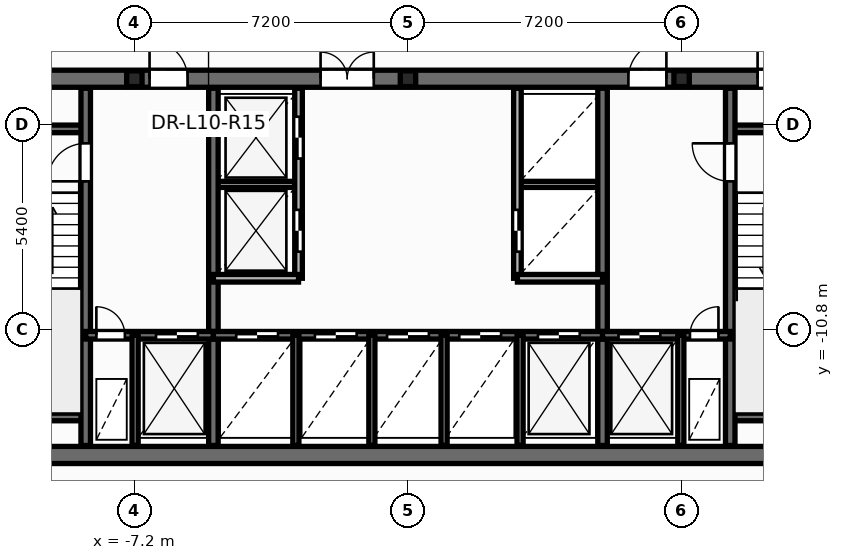
"""IFC4 building model, lengths in metres.
Left out: names, types, materials, properties, quantities, classifications, styles, units other than length and angle.
Written with IfcOpenShell. Run it as: python <this file> out.ifc"""

import sys

from ifc_helpers import new_model, si_unit, direction, frame, frame_2d, origin, origin_2d, place, context, subcontext, project, spatial, rectangle, i_section, extrude, element, fill, save


model = new_model("IFC4")
c1 = context("Model", 3, precision=1e-05, world=origin(), true_north=direction((0.0, 1.0)))
c2 = subcontext(c1, "Body", "Model", "MODEL_VIEW")
j1 = project(units=[si_unit("LENGTHUNIT", "METRE"), si_unit("PLANEANGLEUNIT", "RADIAN")], contexts=[c1])
p1 = place(None, origin())
s1 = spatial("IfcSite", under=j1, at=p1, CompositionType="ELEMENT")
p2 = place(p1, origin())
s2 = spatial("IfcBuilding", under=s1, at=p2, CompositionType="ELEMENT")
p3 = place(p2, frame((0.0, 0.0, 42.3)))
s3 = spatial("IfcBuildingStorey", under=s2, at=p3, CompositionType="ELEMENT", Elevation=42.3)
for number, where, z_axis, x_axis in (
    (1, (-7.2, -4.2, 0.0), (0.0, 0.0, 1.0), (1.0, 0.0, 0.0)),
    (2, (0.0, -4.2, 0.0), (0.0, 0.0, 1.0), (1.0, 0.0, 0.0)),
    (3, (7.2, -4.2, 0.0), (0.0, 0.0, 1.0), (1.0, 0.0, 0.0)),
):
    element("IfcColumn", number, at=place(p3, frame(where, z_axis=z_axis, x_axis=x_axis)), inside=s3, PredefinedType="PILASTER", context=c2, shape_type="SweptSolid", body=[
        extrude(i_section(OverallWidth=0.405, OverallDepth=0.414, WebThickness=0.022, FlangeThickness=0.032, at=origin_2d()), origin(), (0.0, 0.0, 1.0), 3.6),
    ])
for number, where, z_axis, x_axis in (
    (4, (-5.12, -6.98, 0.0), (0.0, 0.0, 1.0), (1.0, 0.0, 0.0)),
    (5, (2.88, -6.98, 0.0), (0.0, 0.0, 1.0), (1.0, 0.0, 0.0)),
):
    element("IfcWall", number, at=place(p3, frame(where, z_axis=z_axis, x_axis=x_axis)), inside=s3, PredefinedType="PARTITIONING", context=c2, shape_type="SweptSolid", body=[
        extrude(rectangle(XDim=2.24, YDim=0.16, at=frame_2d((1.12, 0.0))), origin(), (0.0, 0.0, 1.0), 3.35),
    ])
p4 = place(p3, frame((-12.65, -14.1, 0.0), z_axis=(0.0, 0.0, 1.0), x_axis=(1.0, 0.0, 0.0)))
e6 = element("IfcWall", 6, at=p4, inside=s3, PredefinedType="SHEAR", context=c2, shape_type="SweptSolid", body=[
    extrude(rectangle(XDim=25.3, YDim=0.45, at=frame_2d((12.65, 0.0))), origin(), (0.0, 0.0, 1.0), 3.6),
])
p5 = place(p3, frame((-12.65, -4.2, 0.0), z_axis=(0.0, 0.0, 1.0), x_axis=(1.0, 0.0, 0.0)))
e7 = element("IfcWall", 7, at=p5, inside=s3, PredefinedType="SHEAR", context=c2, shape_type="SweptSolid", body=[
    extrude(rectangle(XDim=25.3, YDim=0.45, at=frame_2d((12.65, 0.0))), origin(), (0.0, 0.0, 1.0), 3.6),
])
p6 = place(p5, frame((1.85, 0.0, 0.0)))
e8 = element("IfcOpeningElement", 8, at=p6, cuts=e7, PredefinedType="OPENING", context=c2, shape_type="SweptSolid", body=[
    extrude(rectangle(XDim=0.756, YDim=2.054, at=frame_2d((0.375, 1.027))), frame((0.0, 0.235, 0.0), z_axis=(0.0, -1.0, 0.0), x_axis=(1.0, 0.0, 0.0)), (0.0, 0.0, 1.0), 0.47),
])
p7 = place(p5, frame((21.85, 0.0, 0.0)))
e9 = element("IfcOpeningElement", 9, at=p7, cuts=e7, PredefinedType="OPENING", context=c2, shape_type="SweptSolid", body=[
    extrude(rectangle(XDim=0.756, YDim=2.054, at=frame_2d((0.375, 1.027))), frame((0.0, 0.235, 0.0), z_axis=(0.0, -1.0, 0.0), x_axis=(1.0, 0.0, 0.0)), (0.0, 0.0, 1.0), 0.47),
])
p8 = place(p5, frame((23.5, 0.0, 0.0)))
e10 = element("IfcOpeningElement", 10, at=p8, cuts=e7, PredefinedType="OPENING", context=c2, shape_type="SweptSolid", body=[
    extrude(rectangle(XDim=0.756, YDim=2.054, at=frame_2d((0.375, 1.027))), frame((0.0, 0.235, 0.0), z_axis=(0.0, -1.0, 0.0), x_axis=(1.0, 0.0, 0.0)), (0.0, 0.0, 1.0), 0.47),
])
p9 = place(p5, frame((5.85, 0.0, 0.0)))
e11 = element("IfcOpeningElement", 11, at=p9, cuts=e7, PredefinedType="OPENING", context=c2, shape_type="SweptSolid", body=[
    extrude(rectangle(XDim=1.006, YDim=2.104, at=frame_2d((0.5, 1.052))), frame((0.0, 0.235, 0.0), z_axis=(0.0, -1.0, 0.0), x_axis=(1.0, 0.0, 0.0)), (0.0, 0.0, 1.0), 0.47),
])
p10 = place(p5, frame((10.35, 0.0, 0.0)))
e12 = element("IfcOpeningElement", 12, at=p10, cuts=e7, PredefinedType="OPENING", context=c2, shape_type="SweptSolid", body=[
    extrude(rectangle(XDim=1.406, YDim=2.154, at=frame_2d((0.7, 1.077))), frame((0.0, 0.235, 0.0), z_axis=(0.0, -1.0, 0.0), x_axis=(1.0, 0.0, 0.0)), (0.0, 0.0, 1.0), 0.47),
])
p11 = place(p5, frame((18.45, 0.0, 0.0)))
e13 = element("IfcOpeningElement", 13, at=p11, cuts=e7, PredefinedType="OPENING", context=c2, shape_type="SweptSolid", body=[
    extrude(rectangle(XDim=1.006, YDim=2.104, at=frame_2d((0.5, 1.052))), frame((0.0, 0.235, 0.0), z_axis=(0.0, -1.0, 0.0), x_axis=(1.0, 0.0, 0.0)), (0.0, 0.0, 1.0), 0.47),
])
for number, where, z_axis, x_axis in (
    (14, (-12.35, -5.52, 0.0), (0.0, 0.0, 1.0), (1.0, 0.0, 0.0)),
    (15, (-12.35, -13.1, 0.0), (0.0, 0.0, 1.0), (1.0, 0.0, 0.0)),
    (16, (8.48, -5.52, 0.0), (0.0, 0.0, 1.0), (1.0, 0.0, 0.0)),
    (17, (8.48, -13.1, 0.0), (0.0, 0.0, 1.0), (1.0, 0.0, 0.0)),
):
    element("IfcWall", number, at=place(p3, frame(where, z_axis=z_axis, x_axis=x_axis)), inside=s3, PredefinedType="SOLIDWALL", context=c2, shape_type="SweptSolid", body=[
        extrude(rectangle(XDim=3.87, YDim=0.2, at=frame_2d((1.935, 0.0))), origin(), (0.0, 0.0, 1.0), 3.6),
    ])
p12 = place(p3, frame((-8.48, -13.85, 0.0), z_axis=(0.0, 0.0, 1.0), x_axis=(0.0, 1.0, 0.0)))
e18 = element("IfcWall", 18, at=p12, inside=s3, PredefinedType="SHEAR", context=c2, shape_type="SweptSolid", body=[
    extrude(rectangle(XDim=9.4, YDim=0.25, at=frame_2d((4.7, 0.0))), origin(), (0.0, 0.0, 1.0), 3.6),
])
p13 = place(p12, frame((6.95, 0.0, 0.0)))
e19 = element("IfcOpeningElement", 19, at=p13, cuts=e18, PredefinedType="OPENING", context=c2, shape_type="SweptSolid", body=[
    extrude(rectangle(XDim=1.006, YDim=2.104, at=frame_2d((0.5, 1.052))), frame((0.0, 0.135, 0.0), z_axis=(0.0, -1.0, 0.0), x_axis=(1.0, 0.0, 0.0)), (0.0, 0.0, 1.0), 0.27),
])
p14 = place(p3, frame((8.48, -13.85, 0.0), z_axis=(0.0, 0.0, 1.0), x_axis=(0.0, 1.0, 0.0)))
e20 = element("IfcWall", 20, at=p14, inside=s3, PredefinedType="SHEAR", context=c2, shape_type="SweptSolid", body=[
    extrude(rectangle(XDim=9.4, YDim=0.25, at=frame_2d((4.7, 0.0))), origin(), (0.0, 0.0, 1.0), 3.6),
])
p15 = place(p14, frame((6.95, 0.0, 0.0)))
e21 = element("IfcOpeningElement", 21, at=p15, cuts=e20, PredefinedType="OPENING", context=c2, shape_type="SweptSolid", body=[
    extrude(rectangle(XDim=1.006, YDim=2.104, at=frame_2d((0.5, 1.052))), frame((0.0, 0.135, 0.0), z_axis=(0.0, -1.0, 0.0), x_axis=(1.0, 0.0, 0.0)), (0.0, 0.0, 1.0), 0.27),
])
for number, where, z_axis, x_axis in (
    (22, (-5.12, -13.85, 0.0), (0.0, 0.0, 1.0), (0.0, 1.0, 0.0)),
    (23, (5.12, -13.85, 0.0), (0.0, 0.0, 1.0), (0.0, 1.0, 0.0)),
):
    element("IfcWall", number, at=place(p3, frame(where, z_axis=z_axis, x_axis=x_axis)), inside=s3, PredefinedType="SHEAR", context=c2, shape_type="SweptSolid", body=[
        extrude(rectangle(XDim=9.4, YDim=0.25, at=frame_2d((4.7, 0.0))), origin(), (0.0, 0.0, 1.0), 3.6),
    ])
p16 = place(p3, frame((-8.48, -10.95, 0.0), z_axis=(0.0, 0.0, 1.0), x_axis=(1.0, 0.0, 0.0)))
e24 = element("IfcWall", 24, at=p16, inside=s3, PredefinedType="SOLIDWALL", context=c2, shape_type="SweptSolid", body=[
    extrude(rectangle(XDim=3.36, YDim=0.2, at=frame_2d((1.68, 0.0))), origin(), (0.0, 0.0, 1.0), 3.6),
])
p17 = place(p16, frame((0.28, 0.0, 0.0)))
e25 = element("IfcOpeningElement", 25, at=p17, cuts=e24, PredefinedType="OPENING", context=c2, shape_type="SweptSolid", body=[
    extrude(rectangle(XDim=0.756, YDim=2.054, at=frame_2d((0.375, 1.027))), frame((0.0, 0.11, 0.0), z_axis=(0.0, -1.0, 0.0), x_axis=(1.0, 0.0, 0.0)), (0.0, 0.0, 1.0), 0.22),
])
p18 = place(p16, frame((1.85, 0.0, 0.0)))
e26 = element("IfcOpeningElement", 26, at=p18, cuts=e24, PredefinedType="OPENING", context=c2, shape_type="SweptSolid", body=[
    extrude(rectangle(XDim=1.106, YDim=2.104, at=frame_2d((0.55, 1.052))), frame((0.0, 0.11, 0.0), z_axis=(0.0, -1.0, 0.0), x_axis=(1.0, 0.0, 0.0)), (0.0, 0.0, 1.0), 0.22),
])
p19 = place(p3, frame((-5.12, -10.95, 0.0), z_axis=(0.0, 0.0, 1.0), x_axis=(1.0, 0.0, 0.0)))
e27 = element("IfcWall", 27, at=p19, inside=s3, PredefinedType="SOLIDWALL", context=c2, shape_type="SweptSolid", body=[
    extrude(rectangle(XDim=10.24, YDim=0.2, at=frame_2d((5.12, 0.0))), origin(), (0.0, 0.0, 1.0), 3.6),
])
p20 = place(p19, frame((0.6, 0.0, 0.0)))
e28 = element("IfcOpeningElement", 28, at=p20, cuts=e27, PredefinedType="OPENING", context=c2, shape_type="SweptSolid", body=[
    extrude(rectangle(XDim=1.106, YDim=2.104, at=frame_2d((0.55, 1.052))), frame((0.0, 0.11, 0.0), z_axis=(0.0, -1.0, 0.0), x_axis=(1.0, 0.0, 0.0)), (0.0, 0.0, 1.0), 0.22),
])
p21 = place(p19, frame((2.67, 0.0, 0.0)))
e29 = element("IfcOpeningElement", 29, at=p21, cuts=e27, PredefinedType="OPENING", context=c2, shape_type="SweptSolid", body=[
    extrude(rectangle(XDim=1.106, YDim=2.104, at=frame_2d((0.55, 1.052))), frame((0.0, 0.11, 0.0), z_axis=(0.0, -1.0, 0.0), x_axis=(1.0, 0.0, 0.0)), (0.0, 0.0, 1.0), 0.22),
])
p22 = place(p19, frame((4.57, 0.0, 0.0)))
e30 = element("IfcOpeningElement", 30, at=p22, cuts=e27, PredefinedType="OPENING", context=c2, shape_type="SweptSolid", body=[
    extrude(rectangle(XDim=1.106, YDim=2.104, at=frame_2d((0.55, 1.052))), frame((0.0, 0.11, 0.0), z_axis=(0.0, -1.0, 0.0), x_axis=(1.0, 0.0, 0.0)), (0.0, 0.0, 1.0), 0.22),
])
p23 = place(p19, frame((6.47, 0.0, 0.0)))
e31 = element("IfcOpeningElement", 31, at=p23, cuts=e27, PredefinedType="OPENING", context=c2, shape_type="SweptSolid", body=[
    extrude(rectangle(XDim=1.106, YDim=2.104, at=frame_2d((0.55, 1.052))), frame((0.0, 0.11, 0.0), z_axis=(0.0, -1.0, 0.0), x_axis=(1.0, 0.0, 0.0)), (0.0, 0.0, 1.0), 0.22),
])
p24 = place(p19, frame((8.54, 0.0, 0.0)))
e32 = element("IfcOpeningElement", 32, at=p24, cuts=e27, PredefinedType="OPENING", context=c2, shape_type="SweptSolid", body=[
    extrude(rectangle(XDim=1.106, YDim=2.104, at=frame_2d((0.55, 1.052))), frame((0.0, 0.11, 0.0), z_axis=(0.0, -1.0, 0.0), x_axis=(1.0, 0.0, 0.0)), (0.0, 0.0, 1.0), 0.22),
])
p25 = place(p3, frame((5.12, -10.95, 0.0), z_axis=(0.0, 0.0, 1.0), x_axis=(1.0, 0.0, 0.0)))
e33 = element("IfcWall", 33, at=p25, inside=s3, PredefinedType="SOLIDWALL", context=c2, shape_type="SweptSolid", body=[
    extrude(rectangle(XDim=3.36, YDim=0.2, at=frame_2d((1.68, 0.0))), origin(), (0.0, 0.0, 1.0), 3.6),
])
p26 = place(p25, frame((0.42, 0.0, 0.0)))
e34 = element("IfcOpeningElement", 34, at=p26, cuts=e33, PredefinedType="OPENING", context=c2, shape_type="SweptSolid", body=[
    extrude(rectangle(XDim=1.106, YDim=2.104, at=frame_2d((0.55, 1.052))), frame((0.0, 0.11, 0.0), z_axis=(0.0, -1.0, 0.0), x_axis=(1.0, 0.0, 0.0)), (0.0, 0.0, 1.0), 0.22),
])
p27 = place(p25, frame((2.3, 0.0, 0.0)))
e35 = element("IfcOpeningElement", 35, at=p27, cuts=e33, PredefinedType="OPENING", context=c2, shape_type="SweptSolid", body=[
    extrude(rectangle(XDim=0.756, YDim=2.054, at=frame_2d((0.375, 1.027))), frame((0.0, 0.11, 0.0), z_axis=(0.0, -1.0, 0.0), x_axis=(1.0, 0.0, 0.0)), (0.0, 0.0, 1.0), 0.22),
])
for number, where, z_axis, x_axis in (
    (36, (-7.18, -13.85, 0.0), (0.0, 0.0, 1.0), (0.0, 1.0, 0.0)),
    (37, (7.18, -13.85, 0.0), (0.0, 0.0, 1.0), (0.0, 1.0, 0.0)),
    (38, (-2.95, -13.85, 0.0), (0.0, 0.0, 1.0), (0.0, 1.0, 0.0)),
    (39, (2.95, -13.85, 0.0), (0.0, 0.0, 1.0), (0.0, 1.0, 0.0)),
):
    element("IfcWall", number, at=place(p3, frame(where, z_axis=z_axis, x_axis=x_axis)), inside=s3, PredefinedType="PARTITIONING", context=c2, shape_type="SweptSolid", body=[
        extrude(rectangle(XDim=2.9, YDim=0.16, at=frame_2d((1.45, 0.0))), origin(), (0.0, 0.0, 1.0), 2.375),
    ])
p28 = place(p3, frame((-2.88, -9.45, 0.0), z_axis=(0.0, 0.0, 1.0), x_axis=(0.0, 1.0, 0.0)))
e40 = element("IfcWall", 40, at=p28, inside=s3, PredefinedType="SOLIDWALL", context=c2, shape_type="SweptSolid", body=[
    extrude(rectangle(XDim=5.0, YDim=0.2, at=frame_2d((2.5, 0.0))), origin(), (0.0, 0.0, 1.0), 3.35),
])
p29 = place(p28, frame((0.7, 0.0, 0.0)))
e41 = element("IfcOpeningElement", 41, at=p29, cuts=e40, PredefinedType="OPENING", context=c2, shape_type="SweptSolid", body=[
    extrude(rectangle(XDim=1.106, YDim=2.104, at=frame_2d((0.55, 1.052))), frame((0.0, 0.11, 0.0), z_axis=(0.0, -1.0, 0.0), x_axis=(1.0, 0.0, 0.0)), (0.0, 0.0, 1.0), 0.22),
])
p30 = place(p28, frame((3.15, 0.0, 0.0)))
e42 = element("IfcOpeningElement", 42, at=p30, cuts=e40, PredefinedType="OPENING", context=c2, shape_type="SweptSolid", body=[
    extrude(rectangle(XDim=1.106, YDim=2.104, at=frame_2d((0.55, 1.052))), frame((0.0, 0.11, 0.0), z_axis=(0.0, -1.0, 0.0), x_axis=(1.0, 0.0, 0.0)), (0.0, 0.0, 1.0), 0.22),
])
p31 = place(p3, frame((-5.12, -9.45, 0.0), z_axis=(0.0, 0.0, 1.0), x_axis=(1.0, 0.0, 0.0)))
e43 = element("IfcWall", 43, at=p31, inside=s3, PredefinedType="SOLIDWALL", context=c2, shape_type="SweptSolid", body=[
    extrude(rectangle(XDim=2.24, YDim=0.2, at=frame_2d((1.12, 0.0))), origin(), (0.0, 0.0, 1.0), 3.35),
])
p32 = place(p3, frame((2.88, -9.45, 0.0), z_axis=(0.0, 0.0, 1.0), x_axis=(0.0, 1.0, 0.0)))
e44 = element("IfcWall", 44, at=p32, inside=s3, PredefinedType="SOLIDWALL", context=c2, shape_type="SweptSolid", body=[
    extrude(rectangle(XDim=5.0, YDim=0.2, at=frame_2d((2.5, 0.0))), origin(), (0.0, 0.0, 1.0), 3.35),
])
p33 = place(p32, frame((0.7, 0.0, 0.0)))
e45 = element("IfcOpeningElement", 45, at=p33, cuts=e44, PredefinedType="OPENING", context=c2, shape_type="SweptSolid", body=[
    extrude(rectangle(XDim=1.106, YDim=2.104, at=frame_2d((0.55, 1.052))), frame((0.0, 0.11, 0.0), z_axis=(0.0, -1.0, 0.0), x_axis=(1.0, 0.0, 0.0)), (0.0, 0.0, 1.0), 0.22),
])
p34 = place(p3, frame((2.88, -9.45, 0.0), z_axis=(0.0, 0.0, 1.0), x_axis=(1.0, 0.0, 0.0)))
e46 = element("IfcWall", 46, at=p34, inside=s3, PredefinedType="SOLIDWALL", context=c2, shape_type="SweptSolid", body=[
    extrude(rectangle(XDim=2.24, YDim=0.2, at=frame_2d((1.12, 0.0))), origin(), (0.0, 0.0, 1.0), 3.35),
])
for number, where, z_axis, x_axis in (
    (47, (-0.95, -13.85, 0.0), (0.0, 0.0, 1.0), (0.0, 1.0, 0.0)),
    (48, (0.95, -13.85, 0.0), (0.0, 0.0, 1.0), (0.0, 1.0, 0.0)),
):
    element("IfcWall", number, at=place(p3, frame(where, z_axis=z_axis, x_axis=x_axis)), inside=s3, PredefinedType="PARTITIONING", context=c2, shape_type="SweptSolid", body=[
        extrude(rectangle(XDim=2.9, YDim=0.16, at=frame_2d((1.45, 0.0))), origin(), (0.0, 0.0, 1.0), 2.375),
    ])
p35 = place(p29, origin())
e49 = element("IfcDoor", 49, at=p35, inside=s3, OperationType="DOUBLE_DOOR_SLIDING", PredefinedType="DOOR", context=c2, shape_type="SweptSolid", body=[
    extrude(rectangle(XDim=1.1, YDim=2.1, at=frame_2d((0.55, 1.05))), frame((0.0, 0.025, 0.0), z_axis=(0.0, -1.0, 0.0), x_axis=(1.0, 0.0, 0.0)), (0.0, 0.0, 1.0), 0.05),
])
fill(e41, e49)
p36 = place(p30, origin())
e50 = element("IfcDoor", 50, at=p36, inside=s3, OperationType="DOUBLE_DOOR_SLIDING", PredefinedType="DOOR", context=c2, shape_type="SweptSolid", body=[
    extrude(rectangle(XDim=1.1, YDim=2.1, at=frame_2d((0.55, 1.05))), frame((0.0, 0.025, 0.0), z_axis=(0.0, -1.0, 0.0), x_axis=(1.0, 0.0, 0.0)), (0.0, 0.0, 1.0), 0.05),
])
fill(e42, e50)
p37 = place(p33, origin())
e51 = element("IfcDoor", 51, at=p37, inside=s3, OperationType="DOUBLE_DOOR_SLIDING", PredefinedType="DOOR", context=c2, shape_type="SweptSolid", body=[
    extrude(rectangle(XDim=1.1, YDim=2.1, at=frame_2d((0.55, 1.05))), frame((0.0, 0.025, 0.0), z_axis=(0.0, -1.0, 0.0), x_axis=(1.0, 0.0, 0.0)), (0.0, 0.0, 1.0), 0.05),
])
fill(e45, e51)
p38 = place(p13, origin())
e52 = element("IfcDoor", 52, at=p38, inside=s3, OperationType="SINGLE_SWING_LEFT", PredefinedType="DOOR", context=c2, shape_type="SweptSolid", body=[
    extrude(rectangle(XDim=1.0, YDim=2.1, at=frame_2d((0.5, 1.05))), frame((0.0, 0.025, 0.0), z_axis=(0.0, -1.0, 0.0), x_axis=(1.0, 0.0, 0.0)), (0.0, 0.0, 1.0), 0.05),
])
fill(e19, e52)
p39 = place(p15, origin())
e53 = element("IfcDoor", 53, at=p39, inside=s3, OperationType="SINGLE_SWING_RIGHT", PredefinedType="DOOR", context=c2, shape_type="SweptSolid", body=[
    extrude(rectangle(XDim=1.0, YDim=2.1, at=frame_2d((0.5, 1.05))), frame((0.0, 0.025, 0.0), z_axis=(0.0, -1.0, 0.0), x_axis=(1.0, 0.0, 0.0)), (0.0, 0.0, 1.0), 0.05),
])
fill(e21, e53)
p40 = place(p17, origin())
e54 = element("IfcDoor", 54, at=p40, inside=s3, OperationType="SINGLE_SWING_LEFT", PredefinedType="DOOR", context=c2, shape_type="SweptSolid", body=[
    extrude(rectangle(XDim=0.75, YDim=2.05, at=frame_2d((0.375, 1.025))), frame((0.0, 0.025, 0.0), z_axis=(0.0, -1.0, 0.0), x_axis=(1.0, 0.0, 0.0)), (0.0, 0.0, 1.0), 0.05),
])
fill(e25, e54)
p41 = place(p18, origin())
e55 = element("IfcDoor", 55, at=p41, inside=s3, OperationType="DOUBLE_DOOR_SLIDING", PredefinedType="DOOR", context=c2, shape_type="SweptSolid", body=[
    extrude(rectangle(XDim=1.1, YDim=2.1, at=frame_2d((0.55, 1.05))), frame((0.0, 0.025, 0.0), z_axis=(0.0, -1.0, 0.0), x_axis=(1.0, 0.0, 0.0)), (0.0, 0.0, 1.0), 0.05),
])
fill(e26, e55)
p42 = place(p26, origin())
e56 = element("IfcDoor", 56, at=p42, inside=s3, OperationType="DOUBLE_DOOR_SLIDING", PredefinedType="DOOR", context=c2, shape_type="SweptSolid", body=[
    extrude(rectangle(XDim=1.1, YDim=2.1, at=frame_2d((0.55, 1.05))), frame((0.0, 0.025, 0.0), z_axis=(0.0, -1.0, 0.0), x_axis=(1.0, 0.0, 0.0)), (0.0, 0.0, 1.0), 0.05),
])
fill(e34, e56)
p43 = place(p27, origin())
e57 = element("IfcDoor", 57, at=p43, inside=s3, OperationType="SINGLE_SWING_RIGHT", PredefinedType="DOOR", context=c2, shape_type="SweptSolid", body=[
    extrude(rectangle(XDim=0.75, YDim=2.05, at=frame_2d((0.375, 1.025))), frame((0.0, 0.025, 0.0), z_axis=(0.0, -1.0, 0.0), x_axis=(1.0, 0.0, 0.0)), (0.0, 0.0, 1.0), 0.05),
])
fill(e35, e57)
p44 = place(p20, origin())
e58 = element("IfcDoor", 58, at=p44, inside=s3, OperationType="DOUBLE_DOOR_SLIDING", PredefinedType="DOOR", context=c2, shape_type="SweptSolid", body=[
    extrude(rectangle(XDim=1.1, YDim=2.1, at=frame_2d((0.55, 1.05))), frame((0.0, 0.025, 0.0), z_axis=(0.0, -1.0, 0.0), x_axis=(1.0, 0.0, 0.0)), (0.0, 0.0, 1.0), 0.05),
])
fill(e28, e58)
p45 = place(p21, origin())
e59 = element("IfcDoor", 59, at=p45, inside=s3, OperationType="DOUBLE_DOOR_SLIDING", PredefinedType="DOOR", context=c2, shape_type="SweptSolid", body=[
    extrude(rectangle(XDim=1.1, YDim=2.1, at=frame_2d((0.55, 1.05))), frame((0.0, 0.025, 0.0), z_axis=(0.0, -1.0, 0.0), x_axis=(1.0, 0.0, 0.0)), (0.0, 0.0, 1.0), 0.05),
])
fill(e29, e59)
p46 = place(p22, origin())
e60 = element("IfcDoor", 60, at=p46, inside=s3, OperationType="DOUBLE_DOOR_SLIDING", PredefinedType="DOOR", context=c2, shape_type="SweptSolid", body=[
    extrude(rectangle(XDim=1.1, YDim=2.1, at=frame_2d((0.55, 1.05))), frame((0.0, 0.025, 0.0), z_axis=(0.0, -1.0, 0.0), x_axis=(1.0, 0.0, 0.0)), (0.0, 0.0, 1.0), 0.05),
])
fill(e30, e60)
p47 = place(p23, origin())
e61 = element("IfcDoor", 61, at=p47, inside=s3, OperationType="DOUBLE_DOOR_SLIDING", PredefinedType="DOOR", context=c2, shape_type="SweptSolid", body=[
    extrude(rectangle(XDim=1.1, YDim=2.1, at=frame_2d((0.55, 1.05))), frame((0.0, 0.025, 0.0), z_axis=(0.0, -1.0, 0.0), x_axis=(1.0, 0.0, 0.0)), (0.0, 0.0, 1.0), 0.05),
])
fill(e31, e61)
p48 = place(p24, origin())
e62 = element("IfcDoor", 62, at=p48, inside=s3, OperationType="DOUBLE_DOOR_SLIDING", PredefinedType="DOOR", context=c2, shape_type="SweptSolid", body=[
    extrude(rectangle(XDim=1.1, YDim=2.1, at=frame_2d((0.55, 1.05))), frame((0.0, 0.025, 0.0), z_axis=(0.0, -1.0, 0.0), x_axis=(1.0, 0.0, 0.0)), (0.0, 0.0, 1.0), 0.05),
])
fill(e32, e62)
p49 = place(p7, origin())
e63 = element("IfcDoor", 63, at=p49, inside=s3, OperationType="SINGLE_SWING_LEFT", PredefinedType="DOOR", context=c2, shape_type="SweptSolid", body=[
    extrude(rectangle(XDim=0.75, YDim=2.05, at=frame_2d((0.375, 1.025))), frame((0.0, 0.025, 0.0), z_axis=(0.0, -1.0, 0.0), x_axis=(1.0, 0.0, 0.0)), (0.0, 0.0, 1.0), 0.05),
])
fill(e9, e63)
p50 = place(p9, origin())
e64 = element("IfcDoor", 64, at=p50, inside=s3, OperationType="SINGLE_SWING_LEFT", PredefinedType="DOOR", context=c2, shape_type="SweptSolid", body=[
    extrude(rectangle(XDim=1.0, YDim=2.1, at=frame_2d((0.5, 1.05))), frame((0.0, 0.025, 0.0), z_axis=(0.0, -1.0, 0.0), x_axis=(1.0, 0.0, 0.0)), (0.0, 0.0, 1.0), 0.05),
])
fill(e11, e64)
p51 = place(p10, origin())
e65 = element("IfcDoor", 65, at=p51, inside=s3, OperationType="DOUBLE_DOOR_SINGLE_SWING", PredefinedType="DOOR", context=c2, shape_type="SweptSolid", body=[
    extrude(rectangle(XDim=1.4, YDim=2.15, at=frame_2d((0.7, 1.075))), frame((0.0, 0.025, 0.0), z_axis=(0.0, -1.0, 0.0), x_axis=(1.0, 0.0, 0.0)), (0.0, 0.0, 1.0), 0.05),
])
fill(e12, e65)
p52 = place(p11, origin())
e66 = element("IfcDoor", 66, at=p52, inside=s3, OperationType="SINGLE_SWING_RIGHT", PredefinedType="DOOR", context=c2, shape_type="SweptSolid", body=[
    extrude(rectangle(XDim=1.0, YDim=2.1, at=frame_2d((0.5, 1.05))), frame((0.0, 0.025, 0.0), z_axis=(0.0, -1.0, 0.0), x_axis=(1.0, 0.0, 0.0)), (0.0, 0.0, 1.0), 0.05),
])
fill(e13, e66)
save(model, sys.argv[1])
